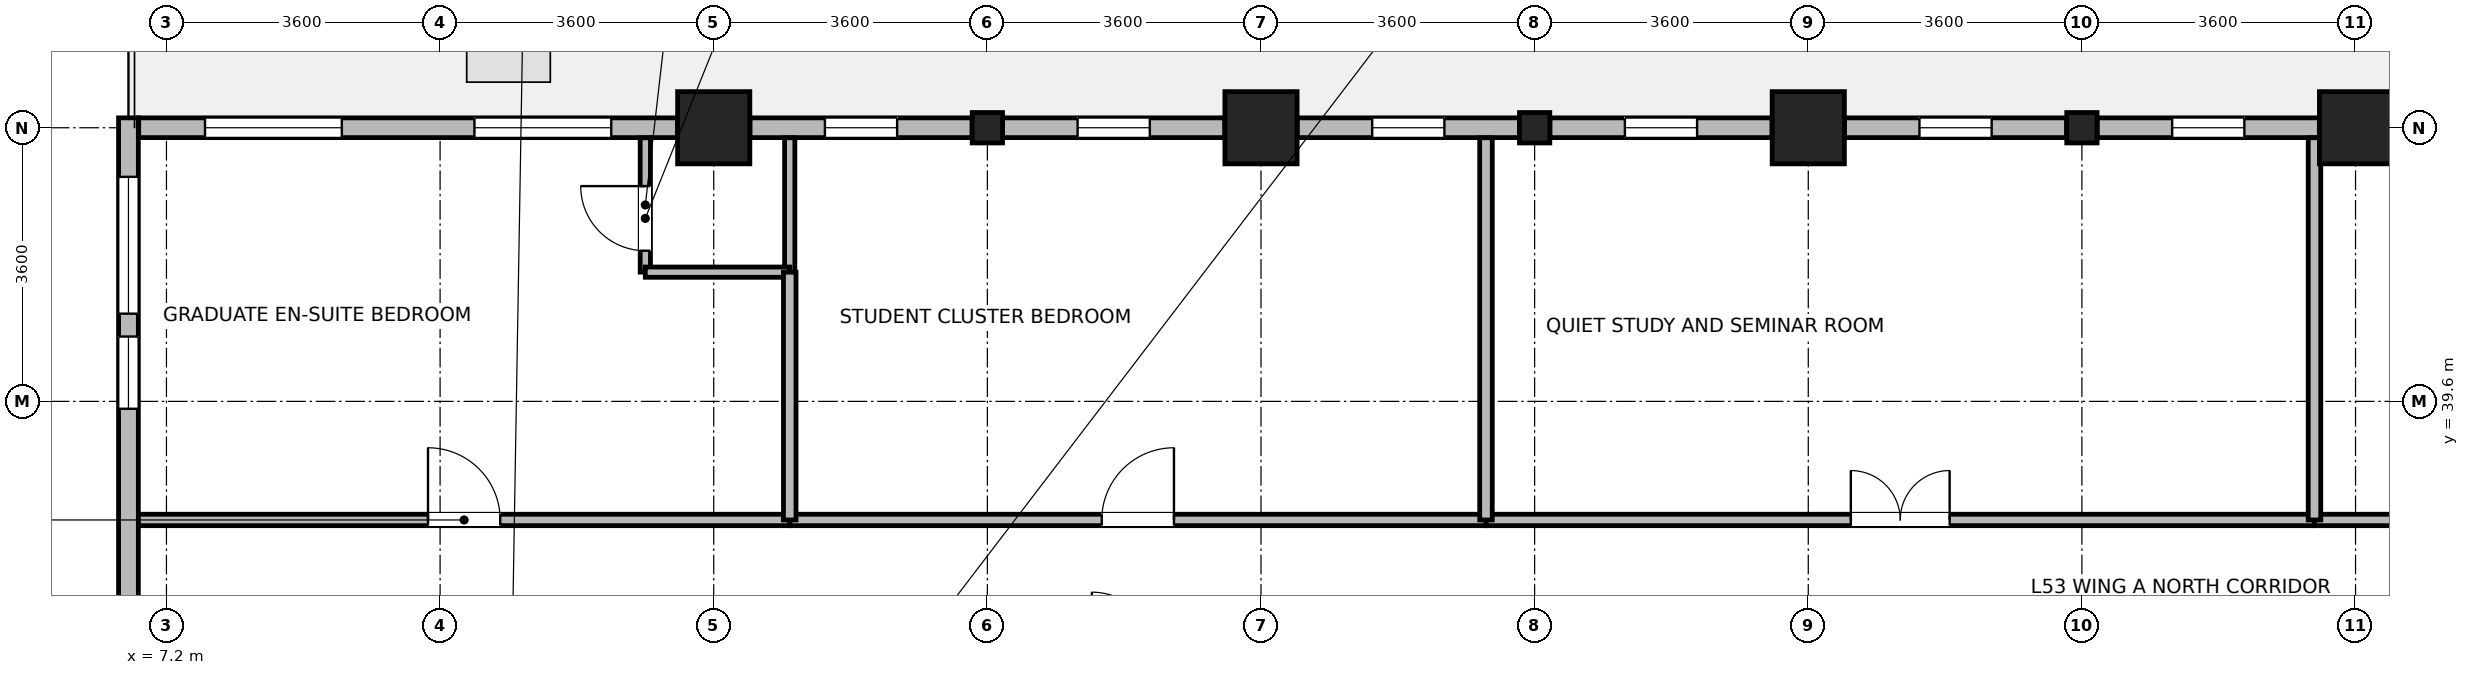
"""IFC4 building model, lengths in metres.
Left out: names, types, materials, properties, quantities, classifications, styles, units other than length and angle.
Written with IfcOpenShell. Run it as: python <this file> out.ifc"""

import sys

from ifc_helpers import new_model, si_unit, direction, frame, frame_2d, origin, origin_2d, place, context, subcontext, project, spatial, rectangle, i_section, extrude, source, transform, mapped, element, fill, save


model = new_model("IFC4")
c1 = context("Model", 3, precision=1e-05, world=origin(), true_north=direction((0.0, 1.0)))
c2 = subcontext(c1, "Body", "Model", "MODEL_VIEW")
j1 = project(units=[si_unit("LENGTHUNIT", "METRE"), si_unit("PLANEANGLEUNIT", "RADIAN")], contexts=[c1])
p1 = place(None, origin())
s1 = spatial("IfcSite", under=j1, at=p1, CompositionType="ELEMENT")
p2 = place(p1, origin())
s2 = spatial("IfcBuilding", under=s1, at=p2, CompositionType="ELEMENT")
p3 = place(p2, frame((0.0, 0.0, 209.2)))
s3 = spatial("IfcBuildingStorey", under=s2, at=p3, CompositionType="ELEMENT", Elevation=209.2)
m1 = source(origin(), c2, "Body", "SweptSolid", [
    extrude(rectangle(XDim=0.95, YDim=0.95, at=origin_2d()), origin(), (0.0, 0.0, 1.0), 3.7),
])
for number, where, z_axis, x_axis in (
    (1, (14.4, 43.2, 0.0), (0.0, 0.0, 1.0), (1.0, 0.0, 0.0)),
    (2, (21.6, 43.2, 0.0), (0.0, 0.0, 1.0), (1.0, 0.0, 0.0)),
    (3, (28.8, 43.2, 0.0), (0.0, 0.0, 1.0), (1.0, 0.0, 0.0)),
    (4, (36.0, 43.2, 0.0), (0.0, 0.0, 1.0), (1.0, 0.0, 0.0)),
):
    element("IfcColumn", number, at=place(p3, frame(where, z_axis=z_axis, x_axis=x_axis)), inside=s3, PredefinedType="COLUMN", context=c2, shape_type="MappedRepresentation", body=[
        mapped(m1, transform((0.0, 0.0, 0.0), x_axis=(1.0, 0.0, 0.0), y_axis=(0.0, 1.0, 0.0), z_axis=(0.0, 0.0, 1.0), scale=1.0)),
    ])
m2 = source(origin(), c2, "Body", "SweptSolid", [
    extrude(i_section(OverallWidth=0.399, OverallDepth=0.4, WebThickness=0.017, FlangeThickness=0.023, FilletRadius=0.015, at=origin_2d()), origin(), (0.0, 0.0, 1.0), 3.7),
])
for number, where, z_axis, x_axis in (
    (5, (18.0, 43.2, 0.0), (0.0, 0.0, 1.0), (1.0, 0.0, 0.0)),
    (6, (25.2, 43.2, 0.0), (0.0, 0.0, 1.0), (1.0, 0.0, 0.0)),
    (7, (32.4, 43.2, 0.0), (0.0, 0.0, 1.0), (1.0, 0.0, 0.0)),
):
    element("IfcColumn", number, at=place(p3, frame(where, z_axis=z_axis, x_axis=x_axis)), inside=s3, PredefinedType="COLUMN", context=c2, shape_type="MappedRepresentation", body=[
        mapped(m2, transform((0.0, 0.0, 0.0), x_axis=(1.0, 0.0, 0.0), y_axis=(0.0, 1.0, 0.0), z_axis=(0.0, 0.0, 1.0), scale=1.0)),
    ])
p4 = place(p3, frame((32.601, 43.2, 0.0), z_axis=(0.0, 0.0, 1.0), x_axis=(1.0, 0.0, 0.0)))
e8 = element("IfcWall", 8, at=p4, inside=s3, PredefinedType="STANDARD", context=c2, shape_type="SweptSolid", body=[
    extrude(rectangle(XDim=2.923, YDim=0.26, at=frame_2d((1.462, 0.0))), origin(), (0.0, 0.0, 1.0), 3.0),
])
p5 = place(p4, frame((0.987, 0.0, 0.85)))
e9 = element("IfcOpeningElement", 9, at=p5, cuts=e8, PredefinedType="OPENING", context=c2, shape_type="SweptSolid", body=[
    extrude(rectangle(XDim=0.95, YDim=1.75, at=frame_2d((0.475, 0.875))), frame((0.0, 0.14, 0.0), z_axis=(0.0, -1.0, 0.0), x_axis=(1.0, 0.0, 0.0)), (0.0, 0.0, 1.0), 0.28),
])
p6 = place(p3, frame((29.276, 43.2, 0.0), z_axis=(0.0, 0.0, 1.0), x_axis=(1.0, 0.0, 0.0)))
e10 = element("IfcWall", 10, at=p6, inside=s3, PredefinedType="STANDARD", context=c2, shape_type="SweptSolid", body=[
    extrude(rectangle(XDim=2.924, YDim=0.26, at=frame_2d((1.462, 0.0))), origin(), (0.0, 0.0, 1.0), 3.0),
])
p7 = place(p6, frame((0.987, 0.0, 0.85)))
e11 = element("IfcOpeningElement", 11, at=p7, cuts=e10, PredefinedType="OPENING", context=c2, shape_type="SweptSolid", body=[
    extrude(rectangle(XDim=0.95, YDim=1.75, at=frame_2d((0.475, 0.875))), frame((0.0, 0.14, 0.0), z_axis=(0.0, -1.0, 0.0), x_axis=(1.0, 0.0, 0.0)), (0.0, 0.0, 1.0), 0.28),
])
p8 = place(p3, frame((25.4, 43.2, 0.0), z_axis=(0.0, 0.0, 1.0), x_axis=(1.0, 0.0, 0.0)))
e12 = element("IfcWall", 12, at=p8, inside=s3, PredefinedType="STANDARD", context=c2, shape_type="SweptSolid", body=[
    extrude(rectangle(XDim=2.924, YDim=0.26, at=frame_2d((1.462, 0.0))), origin(), (0.0, 0.0, 1.0), 3.0),
])
p9 = place(p8, frame((0.987, 0.0, 0.85)))
e13 = element("IfcOpeningElement", 13, at=p9, cuts=e12, PredefinedType="OPENING", context=c2, shape_type="SweptSolid", body=[
    extrude(rectangle(XDim=0.95, YDim=1.75, at=frame_2d((0.475, 0.875))), frame((0.0, 0.14, 0.0), z_axis=(0.0, -1.0, 0.0), x_axis=(1.0, 0.0, 0.0)), (0.0, 0.0, 1.0), 0.28),
])
p10 = place(p3, frame((22.076, 43.2, 0.0), z_axis=(0.0, 0.0, 1.0), x_axis=(1.0, 0.0, 0.0)))
e14 = element("IfcWall", 14, at=p10, inside=s3, PredefinedType="STANDARD", context=c2, shape_type="SweptSolid", body=[
    extrude(rectangle(XDim=2.924, YDim=0.26, at=frame_2d((1.462, 0.0))), origin(), (0.0, 0.0, 1.0), 3.0),
])
p11 = place(p10, frame((0.987, 0.0, 0.85)))
e15 = element("IfcOpeningElement", 15, at=p11, cuts=e14, PredefinedType="OPENING", context=c2, shape_type="SweptSolid", body=[
    extrude(rectangle(XDim=0.95, YDim=1.75, at=frame_2d((0.475, 0.875))), frame((0.0, 0.14, 0.0), z_axis=(0.0, -1.0, 0.0), x_axis=(1.0, 0.0, 0.0)), (0.0, 0.0, 1.0), 0.28),
])
p12 = place(p3, frame((18.2, 43.2, 0.0), z_axis=(0.0, 0.0, 1.0), x_axis=(1.0, 0.0, 0.0)))
e16 = element("IfcWall", 16, at=p12, inside=s3, PredefinedType="STANDARD", context=c2, shape_type="SweptSolid", body=[
    extrude(rectangle(XDim=2.924, YDim=0.26, at=frame_2d((1.462, 0.0))), origin(), (0.0, 0.0, 1.0), 3.0),
])
p13 = place(p12, frame((0.987, 0.0, 0.85)))
e17 = element("IfcOpeningElement", 17, at=p13, cuts=e16, PredefinedType="OPENING", context=c2, shape_type="SweptSolid", body=[
    extrude(rectangle(XDim=0.95, YDim=1.75, at=frame_2d((0.475, 0.875))), frame((0.0, 0.14, 0.0), z_axis=(0.0, -1.0, 0.0), x_axis=(1.0, 0.0, 0.0)), (0.0, 0.0, 1.0), 0.28),
])
p14 = place(p3, frame((14.876, 43.2, 0.0), z_axis=(0.0, 0.0, 1.0), x_axis=(1.0, 0.0, 0.0)))
e18 = element("IfcWall", 18, at=p14, inside=s3, PredefinedType="STANDARD", context=c2, shape_type="SweptSolid", body=[
    extrude(rectangle(XDim=2.924, YDim=0.26, at=frame_2d((1.462, 0.0))), origin(), (0.0, 0.0, 1.0), 3.0),
])
p15 = place(p14, frame((0.987, 0.0, 0.85)))
e19 = element("IfcOpeningElement", 19, at=p15, cuts=e18, PredefinedType="OPENING", context=c2, shape_type="SweptSolid", body=[
    extrude(rectangle(XDim=0.95, YDim=1.75, at=frame_2d((0.475, 0.875))), frame((0.0, 0.14, 0.0), z_axis=(0.0, -1.0, 0.0), x_axis=(1.0, 0.0, 0.0)), (0.0, 0.0, 1.0), 0.28),
])
p16 = place(p3, frame((6.835, 43.2, 0.0), z_axis=(0.0, 0.0, 1.0), x_axis=(1.0, 0.0, 0.0)))
e20 = element("IfcWall", 20, at=p16, inside=s3, PredefinedType="STANDARD", context=c2, shape_type="SweptSolid", body=[
    extrude(rectangle(XDim=7.089, YDim=0.26, at=frame_2d((3.544, 0.0))), origin(), (0.0, 0.0, 1.0), 3.45),
])
p17 = place(p16, frame((0.872, 0.0, 0.85)))
e21 = element("IfcOpeningElement", 21, at=p17, cuts=e20, PredefinedType="OPENING", context=c2, shape_type="SweptSolid", body=[
    extrude(rectangle(XDim=1.8, YDim=1.85, at=frame_2d((0.9, 0.925))), frame((0.0, 0.14, 0.0), z_axis=(0.0, -1.0, 0.0), x_axis=(1.0, 0.0, 0.0)), (0.0, 0.0, 1.0), 0.28),
])
p18 = place(p16, frame((4.417, 0.0, 0.85)))
e22 = element("IfcOpeningElement", 22, at=p18, cuts=e20, PredefinedType="OPENING", context=c2, shape_type="SweptSolid", body=[
    extrude(rectangle(XDim=1.8, YDim=1.85, at=frame_2d((0.9, 0.925))), frame((0.0, 0.14, 0.0), z_axis=(0.0, -1.0, 0.0), x_axis=(1.0, 0.0, 0.0)), (0.0, 0.0, 1.0), 0.28),
])
p19 = place(p3, frame((6.7, 36.626, 0.0), z_axis=(0.0, 0.0, 1.0), x_axis=(0.0, 1.0, 0.0)))
e23 = element("IfcWall", 23, at=p19, inside=s3, PredefinedType="STANDARD", context=c2, shape_type="SweptSolid", body=[
    extrude(rectangle(XDim=6.704, YDim=0.26, at=frame_2d((3.352, 0.0))), origin(), (0.0, 0.0, 1.0), 3.45),
])
p20 = place(p19, frame((4.128, 0.0, 0.85)))
e24 = element("IfcOpeningElement", 24, at=p20, cuts=e23, PredefinedType="OPENING", context=c2, shape_type="SweptSolid", body=[
    extrude(rectangle(XDim=1.8, YDim=1.85, at=frame_2d((0.9, 0.925))), frame((0.0, 0.14, 0.0), z_axis=(0.0, -1.0, 0.0), x_axis=(1.0, 0.0, 0.0)), (0.0, 0.0, 1.0), 0.28),
])
p21 = place(p19, frame((2.877, 0.0, 0.85)))
e25 = element("IfcOpeningElement", 25, at=p21, cuts=e23, PredefinedType="OPENING", context=c2, shape_type="SweptSolid", body=[
    extrude(rectangle(XDim=0.95, YDim=1.75, at=frame_2d((0.475, 0.875))), frame((0.0, 0.14, 0.0), z_axis=(0.0, -1.0, 0.0), x_axis=(1.0, 0.0, 0.0)), (0.0, 0.0, 1.0), 0.28),
])
p22 = place(p3, frame((13.5, 41.3, 0.0), z_axis=(0.0, 0.0, 1.0), x_axis=(0.0, 1.0, 0.0)))
e26 = element("IfcWall", 26, at=p22, inside=s3, PredefinedType="PARTITIONING", context=c2, shape_type="SweptSolid", body=[
    extrude(rectangle(XDim=1.768, YDim=0.135, at=frame_2d((0.884, 0.0))), origin(), (0.0, 0.0, 1.0), 3.45),
])
p23 = place(p22, frame((0.282, 0.0, 0.0)))
e27 = element("IfcOpeningElement", 27, at=p23, cuts=e26, PredefinedType="OPENING", context=c2, shape_type="SweptSolid", body=[
    extrude(rectangle(XDim=0.85, YDim=2.04, at=frame_2d((0.425, 1.02))), frame((0.0, 0.078, 0.0), z_axis=(0.0, -1.0, 0.0), x_axis=(1.0, 0.0, 0.0)), (0.0, 0.0, 1.0), 0.155),
])
p24 = place(p3, frame((15.4, 41.3, 0.0), z_axis=(0.0, 0.0, 1.0), x_axis=(0.0, 1.0, 0.0)))
e28 = element("IfcWall", 28, at=p24, inside=s3, PredefinedType="PARTITIONING", context=c2, shape_type="SweptSolid", body=[
    extrude(rectangle(XDim=1.768, YDim=0.135, at=frame_2d((0.884, 0.0))), origin(), (0.0, 0.0, 1.0), 3.45),
])
p25 = place(p3, frame((13.5, 41.3, 0.0), z_axis=(0.0, 0.0, 1.0), x_axis=(1.0, 0.0, 0.0)))
e29 = element("IfcWall", 29, at=p25, inside=s3, PredefinedType="PARTITIONING", context=c2, shape_type="SweptSolid", body=[
    extrude(rectangle(XDim=1.9, YDim=0.135, at=frame_2d((0.95, 0.0))), origin(), (0.0, 0.0, 1.0), 3.45),
])
p26 = place(p3, frame((35.46, 38.04, 0.0), z_axis=(0.0, 0.0, 1.0), x_axis=(1.0, 0.0, 0.0)))
e30 = element("IfcWall", 30, at=p26, inside=s3, PredefinedType="PARTITIONING", context=c2, shape_type="SweptSolid", body=[
    extrude(rectangle(XDim=14.08, YDim=0.15, at=frame_2d((7.04, 0.0))), origin(), (0.0, 0.0, 1.0), 3.45),
])
p27 = place(p26, frame((6.59, 0.0, 0.0)))
e31 = element("IfcOpeningElement", 31, at=p27, cuts=e30, PredefinedType="OPENING", context=c2, shape_type="SweptSolid", body=[
    extrude(rectangle(XDim=0.9, YDim=2.08, at=frame_2d((0.45, 1.04))), frame((0.0, 0.085, 0.0), z_axis=(0.0, -1.0, 0.0), x_axis=(1.0, 0.0, 0.0)), (0.0, 0.0, 1.0), 0.17),
])
p28 = place(p3, frame((24.56, 38.04, 0.0), z_axis=(0.0, 0.0, 1.0), x_axis=(1.0, 0.0, 0.0)))
e32 = element("IfcWall", 32, at=p28, inside=s3, PredefinedType="PARTITIONING", context=c2, shape_type="SweptSolid", body=[
    extrude(rectangle(XDim=10.9, YDim=0.15, at=frame_2d((5.45, 0.0))), origin(), (0.0, 0.0, 1.0), 3.45),
])
p29 = place(p28, frame((4.8, 0.0, 0.0)))
e33 = element("IfcOpeningElement", 33, at=p29, cuts=e32, PredefinedType="OPENING", context=c2, shape_type="SweptSolid", body=[
    extrude(rectangle(XDim=1.3, YDim=2.12, at=frame_2d((0.65, 1.06))), frame((0.0, 0.085, 0.0), z_axis=(0.0, -1.0, 0.0), x_axis=(1.0, 0.0, 0.0)), (0.0, 0.0, 1.0), 0.17),
])
p30 = place(p3, frame((15.4, 38.04, 0.0), z_axis=(0.0, 0.0, 1.0), x_axis=(1.0, 0.0, 0.0)))
e34 = element("IfcWall", 34, at=p30, inside=s3, PredefinedType="PARTITIONING", context=c2, shape_type="SweptSolid", body=[
    extrude(rectangle(XDim=9.16, YDim=0.15, at=frame_2d((4.58, 0.0))), origin(), (0.0, 0.0, 1.0), 3.45),
])
p31 = place(p30, frame((4.105, 0.0, 0.0)))
e35 = element("IfcOpeningElement", 35, at=p31, cuts=e34, PredefinedType="OPENING", context=c2, shape_type="SweptSolid", body=[
    extrude(rectangle(XDim=0.95, YDim=2.1, at=frame_2d((0.475, 1.05))), frame((0.0, 0.085, 0.0), z_axis=(0.0, -1.0, 0.0), x_axis=(1.0, 0.0, 0.0)), (0.0, 0.0, 1.0), 0.17),
])
p32 = place(p3, frame((6.832, 38.04, 0.0), z_axis=(0.0, 0.0, 1.0), x_axis=(1.0, 0.0, 0.0)))
e36 = element("IfcWall", 36, at=p32, inside=s3, PredefinedType="PARTITIONING", context=c2, shape_type="SweptSolid", body=[
    extrude(rectangle(XDim=8.568, YDim=0.15, at=frame_2d((4.284, 0.0))), origin(), (0.0, 0.0, 1.0), 3.45),
])
p33 = place(p32, frame((3.809, 0.0, 0.0)))
e37 = element("IfcOpeningElement", 37, at=p33, cuts=e36, PredefinedType="OPENING", context=c2, shape_type="SweptSolid", body=[
    extrude(rectangle(XDim=0.95, YDim=2.1, at=frame_2d((0.475, 1.05))), frame((0.0, 0.085, 0.0), z_axis=(0.0, -1.0, 0.0), x_axis=(1.0, 0.0, 0.0)), (0.0, 0.0, 1.0), 0.17),
])
for number, where, z_axis, x_axis in (
    (38, (24.56, 38.04, 0.0), (0.0, 0.0, 1.0), (0.0, 1.0, 0.0)),
    (39, (35.46, 38.04, 0.0), (0.0, 0.0, 1.0), (0.0, 1.0, 0.0)),
):
    element("IfcWall", number, at=place(p3, frame(where, z_axis=z_axis, x_axis=x_axis)), inside=s3, PredefinedType="PARTITIONING", context=c2, shape_type="SweptSolid", body=[
        extrude(rectangle(XDim=5.028, YDim=0.165, at=frame_2d((2.514, 0.0))), origin(), (0.0, 0.0, 1.0), 3.45),
    ])
p34 = place(p3, frame((15.4, 38.04, 0.0), z_axis=(0.0, 0.0, 1.0), x_axis=(0.0, 1.0, 0.0)))
e40 = element("IfcWall", 40, at=p34, inside=s3, PredefinedType="PARTITIONING", context=c2, shape_type="SweptSolid", body=[
    extrude(rectangle(XDim=3.26, YDim=0.165, at=frame_2d((1.63, 0.0))), origin(), (0.0, 0.0, 1.0), 3.45),
])
p35 = place(p5, origin())
e41 = element("IfcWindow", 41, at=p35, inside=s3, PartitioningType="SINGLE_PANEL", PredefinedType="WINDOW", context=c2, shape_type="SweptSolid", body=[
    extrude(rectangle(XDim=0.95, YDim=1.75, at=frame_2d((0.475, 0.875))), frame((0.0, 0.03, 0.0), z_axis=(0.0, -1.0, 0.0), x_axis=(1.0, 0.0, 0.0)), (0.0, 0.0, 1.0), 0.06),
])
fill(e9, e41)
p36 = place(p7, origin())
e42 = element("IfcWindow", 42, at=p36, inside=s3, PartitioningType="SINGLE_PANEL", PredefinedType="WINDOW", context=c2, shape_type="SweptSolid", body=[
    extrude(rectangle(XDim=0.95, YDim=1.75, at=frame_2d((0.475, 0.875))), frame((0.0, 0.03, 0.0), z_axis=(0.0, -1.0, 0.0), x_axis=(1.0, 0.0, 0.0)), (0.0, 0.0, 1.0), 0.06),
])
fill(e11, e42)
p37 = place(p9, origin())
e43 = element("IfcWindow", 43, at=p37, inside=s3, PartitioningType="SINGLE_PANEL", PredefinedType="WINDOW", context=c2, shape_type="SweptSolid", body=[
    extrude(rectangle(XDim=0.95, YDim=1.75, at=frame_2d((0.475, 0.875))), frame((0.0, 0.03, 0.0), z_axis=(0.0, -1.0, 0.0), x_axis=(1.0, 0.0, 0.0)), (0.0, 0.0, 1.0), 0.06),
])
fill(e13, e43)
p38 = place(p11, origin())
e44 = element("IfcWindow", 44, at=p38, inside=s3, PartitioningType="SINGLE_PANEL", PredefinedType="WINDOW", context=c2, shape_type="SweptSolid", body=[
    extrude(rectangle(XDim=0.95, YDim=1.75, at=frame_2d((0.475, 0.875))), frame((0.0, 0.03, 0.0), z_axis=(0.0, -1.0, 0.0), x_axis=(1.0, 0.0, 0.0)), (0.0, 0.0, 1.0), 0.06),
])
fill(e15, e44)
p39 = place(p13, origin())
e45 = element("IfcWindow", 45, at=p39, inside=s3, PartitioningType="SINGLE_PANEL", PredefinedType="WINDOW", context=c2, shape_type="SweptSolid", body=[
    extrude(rectangle(XDim=0.95, YDim=1.75, at=frame_2d((0.475, 0.875))), frame((0.0, 0.03, 0.0), z_axis=(0.0, -1.0, 0.0), x_axis=(1.0, 0.0, 0.0)), (0.0, 0.0, 1.0), 0.06),
])
fill(e17, e45)
p40 = place(p15, origin())
e46 = element("IfcWindow", 46, at=p40, inside=s3, PartitioningType="SINGLE_PANEL", PredefinedType="WINDOW", context=c2, shape_type="SweptSolid", body=[
    extrude(rectangle(XDim=0.95, YDim=1.75, at=frame_2d((0.475, 0.875))), frame((0.0, 0.03, 0.0), z_axis=(0.0, -1.0, 0.0), x_axis=(1.0, 0.0, 0.0)), (0.0, 0.0, 1.0), 0.06),
])
fill(e19, e46)
p41 = place(p17, origin())
e47 = element("IfcWindow", 47, at=p41, inside=s3, PartitioningType="SINGLE_PANEL", PredefinedType="WINDOW", context=c2, shape_type="SweptSolid", body=[
    extrude(rectangle(XDim=1.8, YDim=1.85, at=frame_2d((0.9, 0.925))), frame((0.0, 0.03, 0.0), z_axis=(0.0, -1.0, 0.0), x_axis=(1.0, 0.0, 0.0)), (0.0, 0.0, 1.0), 0.06),
])
fill(e21, e47)
p42 = place(p18, origin())
e48 = element("IfcWindow", 48, at=p42, inside=s3, PartitioningType="SINGLE_PANEL", PredefinedType="WINDOW", context=c2, shape_type="SweptSolid", body=[
    extrude(rectangle(XDim=1.8, YDim=1.85, at=frame_2d((0.9, 0.925))), frame((0.0, 0.03, 0.0), z_axis=(0.0, -1.0, 0.0), x_axis=(1.0, 0.0, 0.0)), (0.0, 0.0, 1.0), 0.06),
])
fill(e22, e48)
p43 = place(p20, origin())
e49 = element("IfcWindow", 49, at=p43, inside=s3, PartitioningType="SINGLE_PANEL", PredefinedType="WINDOW", context=c2, shape_type="SweptSolid", body=[
    extrude(rectangle(XDim=1.8, YDim=1.85, at=frame_2d((0.9, 0.925))), frame((0.0, 0.03, 0.0), z_axis=(0.0, -1.0, 0.0), x_axis=(1.0, 0.0, 0.0)), (0.0, 0.0, 1.0), 0.06),
])
fill(e24, e49)
p44 = place(p21, origin())
e50 = element("IfcWindow", 50, at=p44, inside=s3, PartitioningType="SINGLE_PANEL", PredefinedType="WINDOW", context=c2, shape_type="SweptSolid", body=[
    extrude(rectangle(XDim=0.95, YDim=1.75, at=frame_2d((0.475, 0.875))), frame((0.0, 0.03, 0.0), z_axis=(0.0, -1.0, 0.0), x_axis=(1.0, 0.0, 0.0)), (0.0, 0.0, 1.0), 0.06),
])
fill(e25, e50)
p45 = place(p23, origin())
e51 = element("IfcDoor", 51, at=p45, inside=s3, OperationType="SINGLE_SWING_RIGHT", PredefinedType="DOOR", context=c2, shape_type="SweptSolid", body=[
    extrude(rectangle(XDim=0.85, YDim=2.04, at=frame_2d((0.425, 1.02))), frame((0.0, 0.025, 0.0), z_axis=(0.0, -1.0, 0.0), x_axis=(1.0, 0.0, 0.0)), (0.0, 0.0, 1.0), 0.05),
])
fill(e27, e51)
p46 = place(p29, origin())
e52 = element("IfcDoor", 52, at=p46, inside=s3, OperationType="DOUBLE_DOOR_SINGLE_SWING", PredefinedType="DOOR", context=c2, shape_type="SweptSolid", body=[
    extrude(rectangle(XDim=1.3, YDim=2.12, at=frame_2d((0.65, 1.06))), frame((0.0, 0.025, 0.0), z_axis=(0.0, -1.0, 0.0), x_axis=(1.0, 0.0, 0.0)), (0.0, 0.0, 1.0), 0.05),
])
fill(e33, e52)
p47 = place(p31, origin())
e53 = element("IfcDoor", 53, at=p47, inside=s3, OperationType="SINGLE_SWING_RIGHT", PredefinedType="DOOR", context=c2, shape_type="SweptSolid", body=[
    extrude(rectangle(XDim=0.95, YDim=2.1, at=frame_2d((0.475, 1.05))), frame((0.0, 0.025, 0.0), z_axis=(0.0, -1.0, 0.0), x_axis=(1.0, 0.0, 0.0)), (0.0, 0.0, 1.0), 0.05),
])
fill(e35, e53)
p48 = place(p33, origin())
e54 = element("IfcDoor", 54, at=p48, inside=s3, OperationType="SINGLE_SWING_LEFT", PredefinedType="DOOR", context=c2, shape_type="SweptSolid", body=[
    extrude(rectangle(XDim=0.95, YDim=2.1, at=frame_2d((0.475, 1.05))), frame((0.0, 0.025, 0.0), z_axis=(0.0, -1.0, 0.0), x_axis=(1.0, 0.0, 0.0)), (0.0, 0.0, 1.0), 0.05),
])
fill(e37, e54)
save(model, sys.argv[1])
